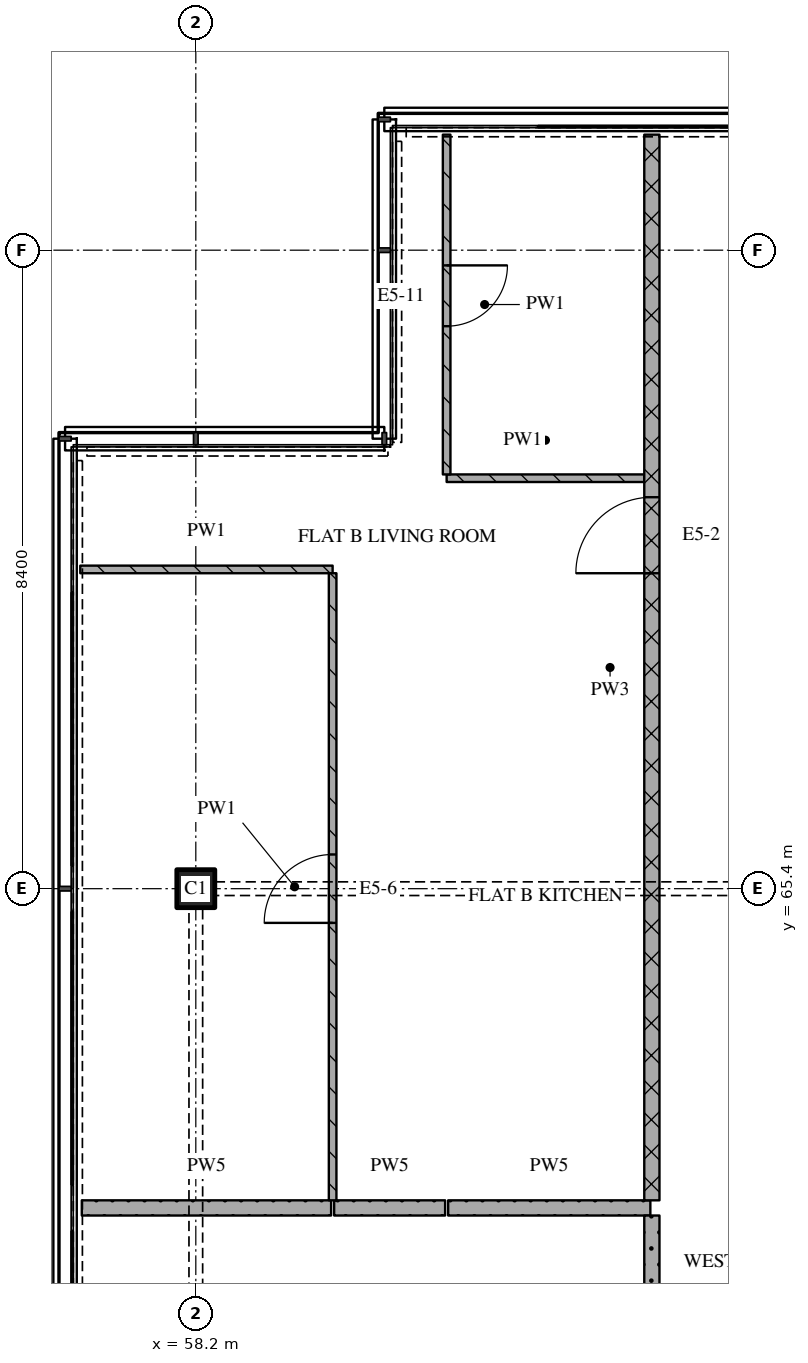
"""IFC4 building model, lengths in metres.
Left out: names, types, materials, properties, quantities, classifications, styles, units other than length and angle.
Written with IfcOpenShell. Run it as: python <this file> out.ifc"""

import sys

from ifc_helpers import new_model, si_unit, direction, frame, frame_2d, origin, origin_2d, place, context, subcontext, project, spatial, rectangle, extrude, element, fill, save


model = new_model("IFC4")
c1 = context("Model", 3, precision=1e-05, world=origin(), true_north=direction((0.0, 1.0)))
c2 = subcontext(c1, "Body", "Model", "MODEL_VIEW")
j1 = project(units=[si_unit("LENGTHUNIT", "METRE"), si_unit("PLANEANGLEUNIT", "RADIAN")], contexts=[c1])
p1 = place(None, origin())
s1 = spatial("IfcSite", under=j1, at=p1, CompositionType="ELEMENT")
p2 = place(p1, origin())
s2 = spatial("IfcBuilding", under=s1, at=p2, CompositionType="ELEMENT")
p3 = place(p2, frame((0.0, 0.0, 295.95)))
s3 = spatial("IfcBuildingStorey", under=s2, at=p3, CompositionType="ELEMENT", Elevation=295.95)
p4 = place(p3, frame((58.2, 65.4, 0.0), z_axis=(0.0, 0.0, 1.0), x_axis=(1.0, 0.0, 0.0)))
e1 = element("IfcColumn", 1, at=p4, inside=s3, PredefinedType="COLUMN", context=c2, shape_type="SweptSolid", body=[
    extrude(rectangle(XDim=0.5, YDim=0.5, at=origin_2d()), origin(), (0.0, 0.0, 1.0), 3.6),
])
p5 = place(p3, frame((56.7, 61.2, 0.0), z_axis=(0.0, 0.0, 1.0), x_axis=(1.0, 0.0, 0.0)))
e2 = element("IfcWall", 2, at=p5, inside=s3, PredefinedType="PARTITIONING", context=c2, shape_type="SweptSolid", body=[
    extrude(rectangle(XDim=3.28, YDim=0.2, at=frame_2d((1.64, 0.0))), origin(), (0.0, 0.0, 1.0), 3.32),
])
p6 = place(p3, frame((60.02, 61.2, 0.0), z_axis=(0.0, 0.0, 1.0), x_axis=(1.0, 0.0, 0.0)))
e3 = element("IfcWall", 3, at=p6, inside=s3, PredefinedType="PARTITIONING", context=c2, shape_type="SweptSolid", body=[
    extrude(rectangle(XDim=1.46, YDim=0.2, at=frame_2d((0.73, 0.0))), origin(), (0.0, 0.0, 1.0), 3.32),
])
p7 = place(p3, frame((61.52, 61.2, 0.0), z_axis=(0.0, 0.0, 1.0), x_axis=(1.0, 0.0, 0.0)))
e4 = element("IfcWall", 4, at=p7, inside=s3, PredefinedType="PARTITIONING", context=c2, shape_type="SweptSolid", body=[
    extrude(rectangle(XDim=2.66, YDim=0.2, at=frame_2d((1.33, 0.0))), origin(), (0.0, 0.0, 1.0), 3.32),
])
p8 = place(p3, frame((56.68, 69.6, 0.0), z_axis=(0.0, 0.0, 1.0), x_axis=(1.0, 0.0, 0.0)))
e5 = element("IfcWall", 5, at=p8, inside=s3, PredefinedType="PARTITIONING", context=c2, shape_type="SweptSolid", body=[
    extrude(rectangle(XDim=3.32, YDim=0.1, at=frame_2d((1.66, 0.0))), origin(), (0.0, 0.0, 1.0), 3.32),
])
p9 = place(p3, frame((61.5, 70.8, 0.0), z_axis=(0.0, 0.0, 1.0), x_axis=(1.0, 0.0, 0.0)))
e6 = element("IfcWall", 6, at=p9, inside=s3, PredefinedType="PARTITIONING", context=c2, shape_type="SweptSolid", body=[
    extrude(rectangle(XDim=2.6, YDim=0.1, at=frame_2d((1.3, 0.0))), origin(), (0.0, 0.0, 1.0), 3.32),
])
p10 = place(p3, frame((60.0, 61.3, 0.0), z_axis=(0.0, 0.0, 1.0), x_axis=(0.0, 1.0, 0.0)))
e7 = element("IfcWall", 7, at=p10, inside=s3, PredefinedType="PARTITIONING", context=c2, shape_type="SweptSolid", body=[
    extrude(rectangle(XDim=8.25, YDim=0.1, at=frame_2d((4.125, 0.0))), origin(), (0.0, 0.0, 1.0), 3.32),
])
p11 = place(p10, frame((3.65, 0.0, 0.0)))
e8 = element("IfcOpeningElement", 8, at=p11, cuts=e7, PredefinedType="OPENING", context=c2, shape_type="SweptSolid", body=[
    extrude(rectangle(XDim=0.9, YDim=2.1, at=frame_2d((0.45, 1.05))), frame((0.0, 0.06, 0.0), z_axis=(0.0, -1.0, 0.0), x_axis=(1.0, 0.0, 0.0)), (0.0, 0.0, 1.0), 0.12),
])
p12 = place(p3, frame((61.5, 75.32, 0.0), z_axis=(0.0, 0.0, 1.0), x_axis=(0.0, -1.0, 0.0)))
e9 = element("IfcWall", 9, at=p12, inside=s3, PredefinedType="PARTITIONING", context=c2, shape_type="SweptSolid", body=[
    extrude(rectangle(XDim=4.47, YDim=0.1, at=frame_2d((2.235, 0.0))), origin(), (0.0, 0.0, 1.0), 3.32),
])
p13 = place(p12, frame((1.72, 0.0, 0.0)))
e10 = element("IfcOpeningElement", 10, at=p13, cuts=e9, PredefinedType="OPENING", context=c2, shape_type="SweptSolid", body=[
    extrude(rectangle(XDim=0.8, YDim=2.1, at=frame_2d((0.4, 1.05))), frame((0.0, 0.06, 0.0), z_axis=(0.0, -1.0, 0.0), x_axis=(1.0, 0.0, 0.0)), (0.0, 0.0, 1.0), 0.12),
])
p14 = place(p3, frame((64.2, 61.3, 0.0), z_axis=(0.0, 0.0, 1.0), x_axis=(0.0, 1.0, 0.0)))
e11 = element("IfcWall", 11, at=p14, inside=s3, PredefinedType="PARTITIONING", context=c2, shape_type="SweptSolid", body=[
    extrude(rectangle(XDim=14.02, YDim=0.2, at=frame_2d((7.01, 0.0))), origin(), (0.0, 0.0, 1.0), 3.32),
])
p15 = place(p14, frame((8.25, 0.0, 0.0)))
e12 = element("IfcOpeningElement", 12, at=p15, cuts=e11, PredefinedType="OPENING", context=c2, shape_type="SweptSolid", body=[
    extrude(rectangle(XDim=1.0, YDim=2.1, at=frame_2d((0.5, 1.05))), frame((0.0, 0.11, 0.0), z_axis=(0.0, -1.0, 0.0), x_axis=(1.0, 0.0, 0.0)), (0.0, 0.0, 1.0), 0.22),
])
p16 = place(p3, frame((64.2, 61.1, 0.0), z_axis=(0.0, 0.0, 1.0), x_axis=(0.0, -1.0, 0.0)))
e13 = element("IfcWall", 13, at=p16, inside=s3, PredefinedType="PARTITIONING", context=c2, shape_type="SweptSolid", body=[
    extrude(rectangle(XDim=2.2, YDim=0.2, at=frame_2d((1.1, 0.0))), origin(), (0.0, 0.0, 1.0), 3.32),
])
p17 = place(p11, origin())
e14 = element("IfcDoor", 14, at=p17, inside=s3, OperationType="SINGLE_SWING_LEFT", PredefinedType="DOOR", context=c2, shape_type="SweptSolid", body=[
    extrude(rectangle(XDim=0.9, YDim=2.1, at=frame_2d((0.45, 1.05))), frame((0.0, 0.025, 0.0), z_axis=(0.0, -1.0, 0.0), x_axis=(1.0, 0.0, 0.0)), (0.0, 0.0, 1.0), 0.05),
])
fill(e8, e14)
p18 = place(p13, origin())
e15 = element("IfcDoor", 15, at=p18, inside=s3, OperationType="SINGLE_SWING_LEFT", PredefinedType="DOOR", context=c2, shape_type="SweptSolid", body=[
    extrude(rectangle(XDim=0.8, YDim=2.1, at=frame_2d((0.4, 1.05))), frame((0.0, 0.025, 0.0), z_axis=(0.0, -1.0, 0.0), x_axis=(1.0, 0.0, 0.0)), (0.0, 0.0, 1.0), 0.05),
])
fill(e10, e15)
p19 = place(p15, origin())
e16 = element("IfcDoor", 16, at=p19, inside=s3, OperationType="SINGLE_SWING_LEFT", PredefinedType="DOOR", context=c2, shape_type="SweptSolid", body=[
    extrude(rectangle(XDim=1.0, YDim=2.1, at=frame_2d((0.5, 1.05))), frame((0.0, 0.025, 0.0), z_axis=(0.0, -1.0, 0.0), x_axis=(1.0, 0.0, 0.0)), (0.0, 0.0, 1.0), 0.05),
])
fill(e12, e16)
save(model, sys.argv[1])
